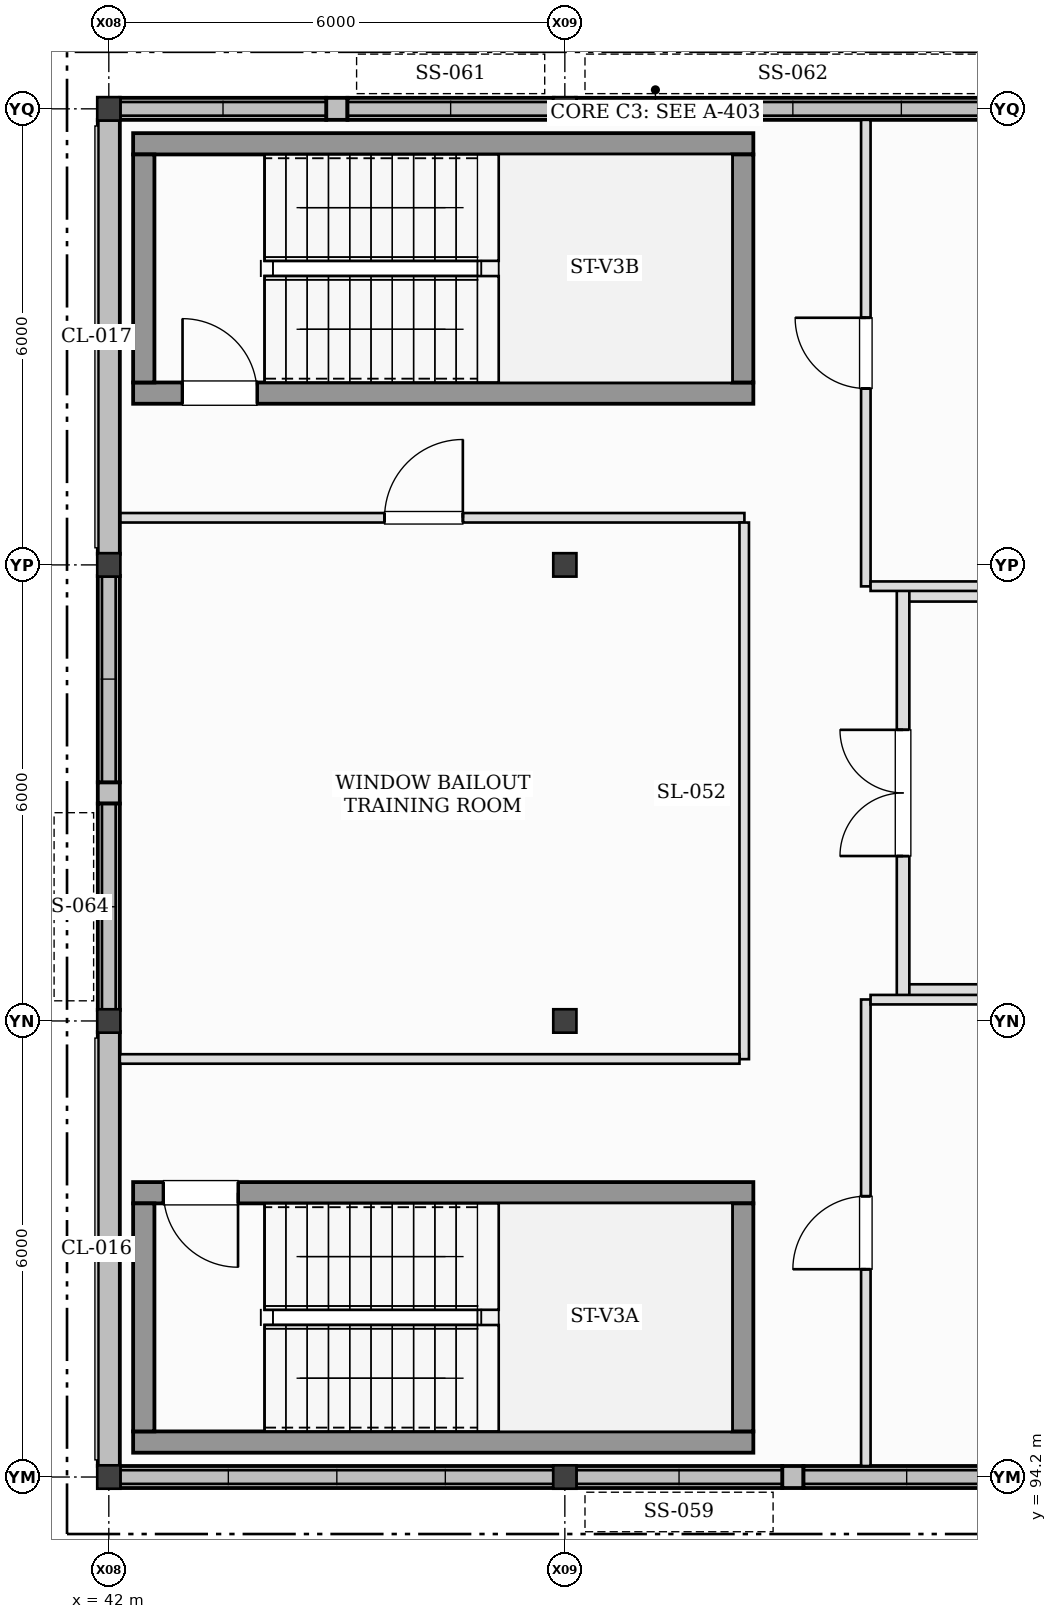
"""IFC4 building model, lengths in metres.
Left out: names, types, materials, properties, quantities, classifications, styles, units other than length and angle.
Written with IfcOpenShell. Run it as: python <this file> out.ifc"""

import sys

from ifc_helpers import new_model, si_unit, direction, frame, frame_2d, origin, origin_2d, place, context, subcontext, project, spatial, rectangle, i_section, extrude, element, fill, save


model = new_model("IFC4")
c1 = context("Model", 3, precision=1e-05, world=origin(), true_north=direction((0.0, 1.0)))
c2 = subcontext(c1, "Body", "Model", "MODEL_VIEW")
j1 = project(units=[si_unit("LENGTHUNIT", "METRE"), si_unit("PLANEANGLEUNIT", "RADIAN")], contexts=[c1])
p1 = place(None, origin())
s1 = spatial("IfcSite", under=j1, at=p1, CompositionType="ELEMENT")
p2 = place(p1, origin())
s2 = spatial("IfcBuilding", under=s1, at=p2, CompositionType="ELEMENT")
p3 = place(p2, frame((0.0, 0.0, 18.0)))
s3 = spatial("IfcBuildingStorey", under=s2, at=p3, CompositionType="ELEMENT", Elevation=18.0)
for number, where, z_axis, x_axis in (
    (1, (42.0, 94.2, 0.0), (0.0, 0.0, 1.0), (1.0, 0.0, 0.0)),
    (2, (42.0, 100.2, 0.0), (0.0, 0.0, 1.0), (1.0, 0.0, 0.0)),
    (3, (42.0, 106.2, 0.0), (0.0, 0.0, 1.0), (1.0, 0.0, 0.0)),
    (4, (42.0, 112.2, 0.0), (0.0, 0.0, 1.0), (1.0, 0.0, 0.0)),
    (5, (48.0, 94.2, 0.0), (0.0, 0.0, 1.0), (1.0, 0.0, 0.0)),
    (6, (48.0, 100.2, 0.0), (0.0, 0.0, 1.0), (1.0, 0.0, 0.0)),
    (7, (48.0, 106.2, 0.0), (0.0, 0.0, 1.0), (1.0, 0.0, 0.0)),
    (8, (48.0, 112.2, 0.0), (0.0, 0.0, 1.0), (1.0, 0.0, 0.0)),
):
    element("IfcColumn", number, at=place(p3, frame(where, z_axis=z_axis, x_axis=x_axis)), inside=s3, PredefinedType="COLUMN", context=c2, shape_type="SweptSolid", body=[
        extrude(i_section(OverallWidth=0.305, OverallDepth=0.308, WebThickness=0.01, FlangeThickness=0.015, at=origin_2d()), origin(), (0.0, 0.0, 1.0), 3.6),
    ])
p4 = place(p3, frame((42.145, 94.2, 0.0), z_axis=(0.0, 0.0, 1.0), x_axis=(1.0, 0.0, 0.0)))
e9 = element("IfcWall", 9, at=p4, inside=s3, PredefinedType="STANDARD", context=c2, shape_type="SweptSolid", body=[
    extrude(rectangle(XDim=5.71, YDim=0.29, at=frame_2d((2.855, 0.0))), origin(), (0.0, 0.0, 1.0), 0.44),
])
p5 = place(p3, frame((50.86, 94.2, 0.0), z_axis=(0.0, 0.0, 1.0), x_axis=(1.0, 0.0, 0.0)))
e10 = element("IfcWall", 10, at=p5, inside=s3, PredefinedType="STANDARD", context=c2, shape_type="SweptSolid", body=[
    extrude(rectangle(XDim=0.28, YDim=0.29, at=frame_2d((0.14, 0.0))), origin(), (0.0, 0.0, 1.0), 2.869),
])
p6 = place(p3, frame((48.145, 94.2, 0.0), z_axis=(0.0, 0.0, 1.0), x_axis=(1.0, 0.0, 0.0)))
e11 = element("IfcWall", 11, at=p6, inside=s3, PredefinedType="STANDARD", context=c2, shape_type="SweptSolid", body=[
    extrude(rectangle(XDim=2.715, YDim=0.29, at=frame_2d((1.357, 0.0))), origin(), (0.0, 0.0, 1.0), 0.56),
])
p7 = place(p3, frame((51.14, 94.2, 0.0), z_axis=(0.0, 0.0, 1.0), x_axis=(1.0, 0.0, 0.0)))
e12 = element("IfcWall", 12, at=p7, inside=s3, PredefinedType="STANDARD", context=c2, shape_type="SweptSolid", body=[
    extrude(rectangle(XDim=2.715, YDim=0.29, at=frame_2d((1.357, 0.0))), origin(), (0.0, 0.0, 1.0), 0.68),
])
p8 = place(p3, frame((45.14, 112.2, 0.0), z_axis=(0.0, 0.0, 1.0), x_axis=(-1.0, 0.0, 0.0)))
e13 = element("IfcWall", 13, at=p8, inside=s3, PredefinedType="STANDARD", context=c2, shape_type="SweptSolid", body=[
    extrude(rectangle(XDim=0.28, YDim=0.29, at=frame_2d((0.14, 0.0))), origin(), (0.0, 0.0, 1.0), 2.869),
])
p9 = place(p3, frame((47.855, 112.2, 0.0), z_axis=(0.0, 0.0, 1.0), x_axis=(-1.0, 0.0, 0.0)))
e14 = element("IfcWall", 14, at=p9, inside=s3, PredefinedType="STANDARD", context=c2, shape_type="SweptSolid", body=[
    extrude(rectangle(XDim=2.715, YDim=0.29, at=frame_2d((1.357, 0.0))), origin(), (0.0, 0.0, 1.0), 0.8),
])
p10 = place(p3, frame((44.86, 112.2, 0.0), z_axis=(0.0, 0.0, 1.0), x_axis=(-1.0, 0.0, 0.0)))
e15 = element("IfcWall", 15, at=p10, inside=s3, PredefinedType="STANDARD", context=c2, shape_type="SweptSolid", body=[
    extrude(rectangle(XDim=2.715, YDim=0.29, at=frame_2d((1.357, 0.0))), origin(), (0.0, 0.0, 1.0), 0.92),
])
p11 = place(p3, frame((53.855, 112.2, 0.0), z_axis=(0.0, 0.0, 1.0), x_axis=(-1.0, 0.0, 0.0)))
e16 = element("IfcWall", 16, at=p11, inside=s3, PredefinedType="STANDARD", context=c2, shape_type="SweptSolid", body=[
    extrude(rectangle(XDim=5.71, YDim=0.29, at=frame_2d((2.855, 0.0))), origin(), (0.0, 0.0, 1.0), 0.32),
])
p12 = place(p3, frame((42.0, 100.055, 0.0), z_axis=(0.0, 0.0, 1.0), x_axis=(0.0, -1.0, 0.0)))
e17 = element("IfcWall", 17, at=p12, inside=s3, PredefinedType="STANDARD", context=c2, shape_type="SweptSolid", body=[
    extrude(rectangle(XDim=5.71, YDim=0.29, at=frame_2d((2.855, 0.0))), origin(), (0.0, 0.0, 1.0), 2.873),
])
p13 = place(p3, frame((42.0, 103.34, 0.0), z_axis=(0.0, 0.0, 1.0), x_axis=(0.0, -1.0, 0.0)))
e18 = element("IfcWall", 18, at=p13, inside=s3, PredefinedType="STANDARD", context=c2, shape_type="SweptSolid", body=[
    extrude(rectangle(XDim=0.28, YDim=0.29, at=frame_2d((0.14, 0.0))), origin(), (0.0, 0.0, 1.0), 2.873),
])
p14 = place(p3, frame((42.0, 106.055, 0.0), z_axis=(0.0, 0.0, 1.0), x_axis=(0.0, -1.0, 0.0)))
e19 = element("IfcWall", 19, at=p14, inside=s3, PredefinedType="STANDARD", context=c2, shape_type="SweptSolid", body=[
    extrude(rectangle(XDim=2.715, YDim=0.29, at=frame_2d((1.357, 0.0))), origin(), (0.0, 0.0, 1.0), 0.44),
])
p15 = place(p3, frame((42.0, 103.06, 0.0), z_axis=(0.0, 0.0, 1.0), x_axis=(0.0, -1.0, 0.0)))
e20 = element("IfcWall", 20, at=p15, inside=s3, PredefinedType="STANDARD", context=c2, shape_type="SweptSolid", body=[
    extrude(rectangle(XDim=2.715, YDim=0.29, at=frame_2d((1.357, 0.0))), origin(), (0.0, 0.0, 1.0), 0.56),
])
p16 = place(p3, frame((42.0, 112.055, 0.0), z_axis=(0.0, 0.0, 1.0), x_axis=(0.0, -1.0, 0.0)))
e21 = element("IfcWall", 21, at=p16, inside=s3, PredefinedType="STANDARD", context=c2, shape_type="SweptSolid", body=[
    extrude(rectangle(XDim=5.71, YDim=0.29, at=frame_2d((2.855, 0.0))), origin(), (0.0, 0.0, 1.0), 2.873),
])
p17 = place(p3, frame((42.32, 94.66, 0.0), z_axis=(0.0, 0.0, 1.0), x_axis=(1.0, 0.0, 0.0)))
e22 = element("IfcWall", 22, at=p17, inside=s3, PredefinedType="SHEAR", context=c2, shape_type="SweptSolid", body=[
    extrude(rectangle(XDim=8.16, YDim=0.28, at=frame_2d((4.08, 0.0))), origin(), (0.0, 0.0, 1.0), 3.6),
])
p18 = place(p3, frame((50.48, 97.94, 0.0), z_axis=(0.0, 0.0, 1.0), x_axis=(-1.0, 0.0, 0.0)))
e23 = element("IfcWall", 23, at=p18, inside=s3, PredefinedType="SHEAR", context=c2, shape_type="SweptSolid", body=[
    extrude(rectangle(XDim=8.16, YDim=0.28, at=frame_2d((4.08, 0.0))), origin(), (0.0, 0.0, 1.0), 3.6),
])
p19 = place(p18, frame((6.78, 0.0, 0.0)))
e24 = element("IfcOpeningElement", 24, at=p19, cuts=e23, PredefinedType="OPENING", context=c2, shape_type="SweptSolid", body=[
    extrude(rectangle(XDim=0.98, YDim=2.15, at=frame_2d((0.49, 1.075))), frame((0.0, 0.15, 0.0), z_axis=(0.0, -1.0, 0.0), x_axis=(1.0, 0.0, 0.0)), (0.0, 0.0, 1.0), 0.3),
])
for number, where, z_axis, x_axis in (
    (25, (42.46, 97.8, 0.0), (0.0, 0.0, 1.0), (0.0, -1.0, 0.0)),
    (26, (50.34, 94.8, 0.0), (0.0, 0.0, 1.0), (0.0, 1.0, 0.0)),
):
    element("IfcWall", number, at=place(p3, frame(where, z_axis=z_axis, x_axis=x_axis)), inside=s3, PredefinedType="SHEAR", context=c2, shape_type="SweptSolid", body=[
        extrude(rectangle(XDim=3.0, YDim=0.28, at=frame_2d((1.5, 0.0))), origin(), (0.0, 0.0, 1.0), 3.6),
    ])
p20 = place(p3, frame((42.32, 108.46, 0.0), z_axis=(0.0, 0.0, 1.0), x_axis=(1.0, 0.0, 0.0)))
e27 = element("IfcWall", 27, at=p20, inside=s3, PredefinedType="SHEAR", context=c2, shape_type="SweptSolid", body=[
    extrude(rectangle(XDim=8.16, YDim=0.28, at=frame_2d((4.08, 0.0))), origin(), (0.0, 0.0, 1.0), 3.6),
])
p21 = place(p20, frame((0.65, 0.0, 0.0)))
e28 = element("IfcOpeningElement", 28, at=p21, cuts=e27, PredefinedType="OPENING", context=c2, shape_type="SweptSolid", body=[
    extrude(rectangle(XDim=0.98, YDim=2.15, at=frame_2d((0.49, 1.075))), frame((0.0, 0.15, 0.0), z_axis=(0.0, -1.0, 0.0), x_axis=(1.0, 0.0, 0.0)), (0.0, 0.0, 1.0), 0.3),
])
p22 = place(p3, frame((50.48, 111.74, 0.0), z_axis=(0.0, 0.0, 1.0), x_axis=(-1.0, 0.0, 0.0)))
e29 = element("IfcWall", 29, at=p22, inside=s3, PredefinedType="SHEAR", context=c2, shape_type="SweptSolid", body=[
    extrude(rectangle(XDim=8.16, YDim=0.28, at=frame_2d((4.08, 0.0))), origin(), (0.0, 0.0, 1.0), 3.6),
])
for number, where, z_axis, x_axis in (
    (30, (42.46, 111.6, 0.0), (0.0, 0.0, 1.0), (0.0, -1.0, 0.0)),
    (31, (50.34, 108.6, 0.0), (0.0, 0.0, 1.0), (0.0, 1.0, 0.0)),
):
    element("IfcWall", number, at=place(p3, frame(where, z_axis=z_axis, x_axis=x_axis)), inside=s3, PredefinedType="SHEAR", context=c2, shape_type="SweptSolid", body=[
        extrude(rectangle(XDim=3.0, YDim=0.28, at=frame_2d((1.5, 0.0))), origin(), (0.0, 0.0, 1.0), 3.6),
    ])
for number, where, z_axis, x_axis in (
    (32, (52.45, 100.6, 0.0), (0.0, 0.0, 1.0), (1.0, 0.0, 0.0)),
    (33, (56.448, 105.8, 0.0), (0.0, 0.0, 1.0), (-1.0, 0.0, 0.0)),
):
    element("IfcWall", number, at=place(p3, frame(where, z_axis=z_axis, x_axis=x_axis)), inside=s3, PredefinedType="PARTITIONING", context=c2, shape_type="SweptSolid", body=[
        extrude(rectangle(XDim=3.998, YDim=0.165, at=frame_2d((1.999, 0.0))), origin(), (0.0, 0.0, 1.0), 3.36),
    ])
p23 = place(p3, frame((52.45, 100.52, 0.0), z_axis=(0.0, 0.0, 1.0), x_axis=(0.0, 1.0, 0.0)))
e34 = element("IfcWall", 34, at=p23, inside=s3, PredefinedType="PARTITIONING", context=c2, shape_type="SweptSolid", body=[
    extrude(rectangle(XDim=5.36, YDim=0.165, at=frame_2d((2.68, 0.0))), origin(), (0.0, 0.0, 1.0), 3.36),
])
p24 = place(p23, frame((1.85, 0.0, 0.0)))
e35 = element("IfcOpeningElement", 35, at=p24, cuts=e34, PredefinedType="OPENING", context=c2, shape_type="SweptSolid", body=[
    extrude(rectangle(XDim=1.66, YDim=2.2, at=frame_2d((0.83, 1.1))), frame((0.0, 0.093, 0.0), z_axis=(0.0, -1.0, 0.0), x_axis=(1.0, 0.0, 0.0)), (0.0, 0.0, 1.0), 0.185),
])
p25 = place(p3, frame((42.145, 106.82, 0.0), z_axis=(0.0, 0.0, 1.0), x_axis=(1.0, 0.0, 0.0)))
e36 = element("IfcWall", 36, at=p25, inside=s3, PredefinedType="PARTITIONING", context=c2, shape_type="SweptSolid", body=[
    extrude(rectangle(XDim=8.218, YDim=0.125, at=frame_2d((4.109, 0.0))), origin(), (0.0, 0.0, 1.0), 3.36),
])
p26 = place(p25, frame((3.483, 0.0, 0.0)))
e37 = element("IfcOpeningElement", 37, at=p26, cuts=e36, PredefinedType="OPENING", context=c2, shape_type="SweptSolid", body=[
    extrude(rectangle(XDim=1.03, YDim=2.15, at=frame_2d((0.515, 1.075))), frame((0.0, 0.073, 0.0), z_axis=(0.0, -1.0, 0.0), x_axis=(1.0, 0.0, 0.0)), (0.0, 0.0, 1.0), 0.145),
])
p27 = place(p3, frame((50.36, 106.758, 0.0), z_axis=(0.0, 0.0, 1.0), x_axis=(0.0, -1.0, 0.0)))
e38 = element("IfcWall", 38, at=p27, inside=s3, PredefinedType="PARTITIONING", context=c2, shape_type="SweptSolid", body=[
    extrude(rectangle(XDim=7.06, YDim=0.125, at=frame_2d((3.53, 0.0))), origin(), (0.0, 0.0, 1.0), 3.36),
])
p28 = place(p3, frame((50.298, 99.7, 0.0), z_axis=(0.0, 0.0, 1.0), x_axis=(-1.0, 0.0, 0.0)))
e39 = element("IfcWall", 39, at=p28, inside=s3, PredefinedType="PARTITIONING", context=c2, shape_type="SweptSolid", body=[
    extrude(rectangle(XDim=8.153, YDim=0.125, at=frame_2d((4.076, 0.0))), origin(), (0.0, 0.0, 1.0), 3.36),
])
p29 = place(p3, frame((51.96, 94.345, 0.0), z_axis=(0.0, 0.0, 1.0), x_axis=(0.0, 1.0, 0.0)))
e40 = element("IfcWall", 40, at=p29, inside=s3, PredefinedType="PARTITIONING", context=c2, shape_type="SweptSolid", body=[
    extrude(rectangle(XDim=6.137, YDim=0.125, at=frame_2d((3.069, 0.0))), origin(), (0.0, 0.0, 1.0), 3.019),
])
p30 = place(p29, frame((2.589, 0.0, 0.0)))
e41 = element("IfcOpeningElement", 41, at=p30, cuts=e40, PredefinedType="OPENING", context=c2, shape_type="SweptSolid", body=[
    extrude(rectangle(XDim=0.96, YDim=2.15, at=frame_2d((0.48, 1.075))), frame((0.0, 0.073, 0.0), z_axis=(0.0, -1.0, 0.0), x_axis=(1.0, 0.0, 0.0)), (0.0, 0.0, 1.0), 0.145),
])
p31 = place(p3, frame((52.022, 100.48, 0.0), z_axis=(0.0, 0.0, 1.0), x_axis=(1.0, 0.0, 0.0)))
e42 = element("IfcWall", 42, at=p31, inside=s3, PredefinedType="PARTITIONING", context=c2, shape_type="SweptSolid", body=[
    extrude(rectangle(XDim=7.833, YDim=0.125, at=frame_2d((3.916, 0.0))), origin(), (0.0, 0.0, 1.0), 2.869),
])
p32 = place(p3, frame((51.96, 105.917, 0.0), z_axis=(0.0, 0.0, 1.0), x_axis=(0.0, 1.0, 0.0)))
e43 = element("IfcWall", 43, at=p32, inside=s3, PredefinedType="PARTITIONING", context=c2, shape_type="SweptSolid", body=[
    extrude(rectangle(XDim=6.137, YDim=0.125, at=frame_2d((3.069, 0.0))), origin(), (0.0, 0.0, 1.0), 3.019),
])
p33 = place(p32, frame((2.604, 0.0, 0.0)))
e44 = element("IfcOpeningElement", 44, at=p33, cuts=e43, PredefinedType="OPENING", context=c2, shape_type="SweptSolid", body=[
    extrude(rectangle(XDim=0.93, YDim=2.1, at=frame_2d((0.465, 1.05))), frame((0.0, 0.073, 0.0), z_axis=(0.0, -1.0, 0.0), x_axis=(1.0, 0.0, 0.0)), (0.0, 0.0, 1.0), 0.145),
])
p34 = place(p3, frame((59.855, 105.92, 0.0), z_axis=(0.0, 0.0, 1.0), x_axis=(-1.0, 0.0, 0.0)))
e45 = element("IfcWall", 45, at=p34, inside=s3, PredefinedType="PARTITIONING", context=c2, shape_type="SweptSolid", body=[
    extrude(rectangle(XDim=7.833, YDim=0.125, at=frame_2d((3.916, 0.0))), origin(), (0.0, 0.0, 1.0), 2.869),
])
p35 = place(p19, origin())
e46 = element("IfcDoor", 46, at=p35, inside=s3, OperationType="SINGLE_SWING_LEFT", PredefinedType="DOOR", context=c2, shape_type="SweptSolid", body=[
    extrude(rectangle(XDim=0.98, YDim=2.15, at=frame_2d((0.49, 1.075))), frame((0.0, 0.025, 0.0), z_axis=(0.0, -1.0, 0.0), x_axis=(1.0, 0.0, 0.0)), (0.0, 0.0, 1.0), 0.05),
])
fill(e24, e46)
p36 = place(p21, origin())
e47 = element("IfcDoor", 47, at=p36, inside=s3, OperationType="SINGLE_SWING_LEFT", PredefinedType="DOOR", context=c2, shape_type="SweptSolid", body=[
    extrude(rectangle(XDim=0.98, YDim=2.15, at=frame_2d((0.49, 1.075))), frame((0.0, 0.025, 0.0), z_axis=(0.0, -1.0, 0.0), x_axis=(1.0, 0.0, 0.0)), (0.0, 0.0, 1.0), 0.05),
])
fill(e28, e47)
p37 = place(p24, frame((1.66, 0.0, 0.0), z_axis=(0.0, 0.0, 1.0), x_axis=(-1.0, 0.0, 0.0)))
e48 = element("IfcDoor", 48, at=p37, inside=s3, OperationType="DOUBLE_DOOR_SINGLE_SWING", PredefinedType="DOOR", context=c2, shape_type="SweptSolid", body=[
    extrude(rectangle(XDim=1.66, YDim=2.2, at=frame_2d((0.83, 1.1))), frame((0.0, 0.025, 0.0), z_axis=(0.0, -1.0, 0.0), x_axis=(1.0, 0.0, 0.0)), (0.0, 0.0, 1.0), 0.05),
])
fill(e35, e48)
p38 = place(p26, frame((1.03, 0.0, 0.0), z_axis=(0.0, 0.0, 1.0), x_axis=(-1.0, 0.0, 0.0)))
e49 = element("IfcDoor", 49, at=p38, inside=s3, OperationType="SINGLE_SWING_RIGHT", PredefinedType="DOOR", context=c2, shape_type="SweptSolid", body=[
    extrude(rectangle(XDim=1.03, YDim=2.15, at=frame_2d((0.515, 1.075))), frame((0.0, 0.025, 0.0), z_axis=(0.0, -1.0, 0.0), x_axis=(1.0, 0.0, 0.0)), (0.0, 0.0, 1.0), 0.05),
])
fill(e37, e49)
p39 = place(p30, frame((0.96, 0.0, 0.0), z_axis=(0.0, 0.0, 1.0), x_axis=(-1.0, 0.0, 0.0)))
e50 = element("IfcDoor", 50, at=p39, inside=s3, OperationType="SINGLE_SWING_LEFT", PredefinedType="DOOR", context=c2, shape_type="SweptSolid", body=[
    extrude(rectangle(XDim=0.96, YDim=2.15, at=frame_2d((0.48, 1.075))), frame((0.0, 0.025, 0.0), z_axis=(0.0, -1.0, 0.0), x_axis=(1.0, 0.0, 0.0)), (0.0, 0.0, 1.0), 0.05),
])
fill(e41, e50)
p40 = place(p33, frame((0.93, 0.0, 0.0), z_axis=(0.0, 0.0, 1.0), x_axis=(-1.0, 0.0, 0.0)))
e51 = element("IfcDoor", 51, at=p40, inside=s3, OperationType="SINGLE_SWING_RIGHT", PredefinedType="DOOR", context=c2, shape_type="SweptSolid", body=[
    extrude(rectangle(XDim=0.93, YDim=2.1, at=frame_2d((0.465, 1.05))), frame((0.0, 0.025, 0.0), z_axis=(0.0, -1.0, 0.0), x_axis=(1.0, 0.0, 0.0)), (0.0, 0.0, 1.0), 0.05),
])
fill(e44, e51)
save(model, sys.argv[1])
